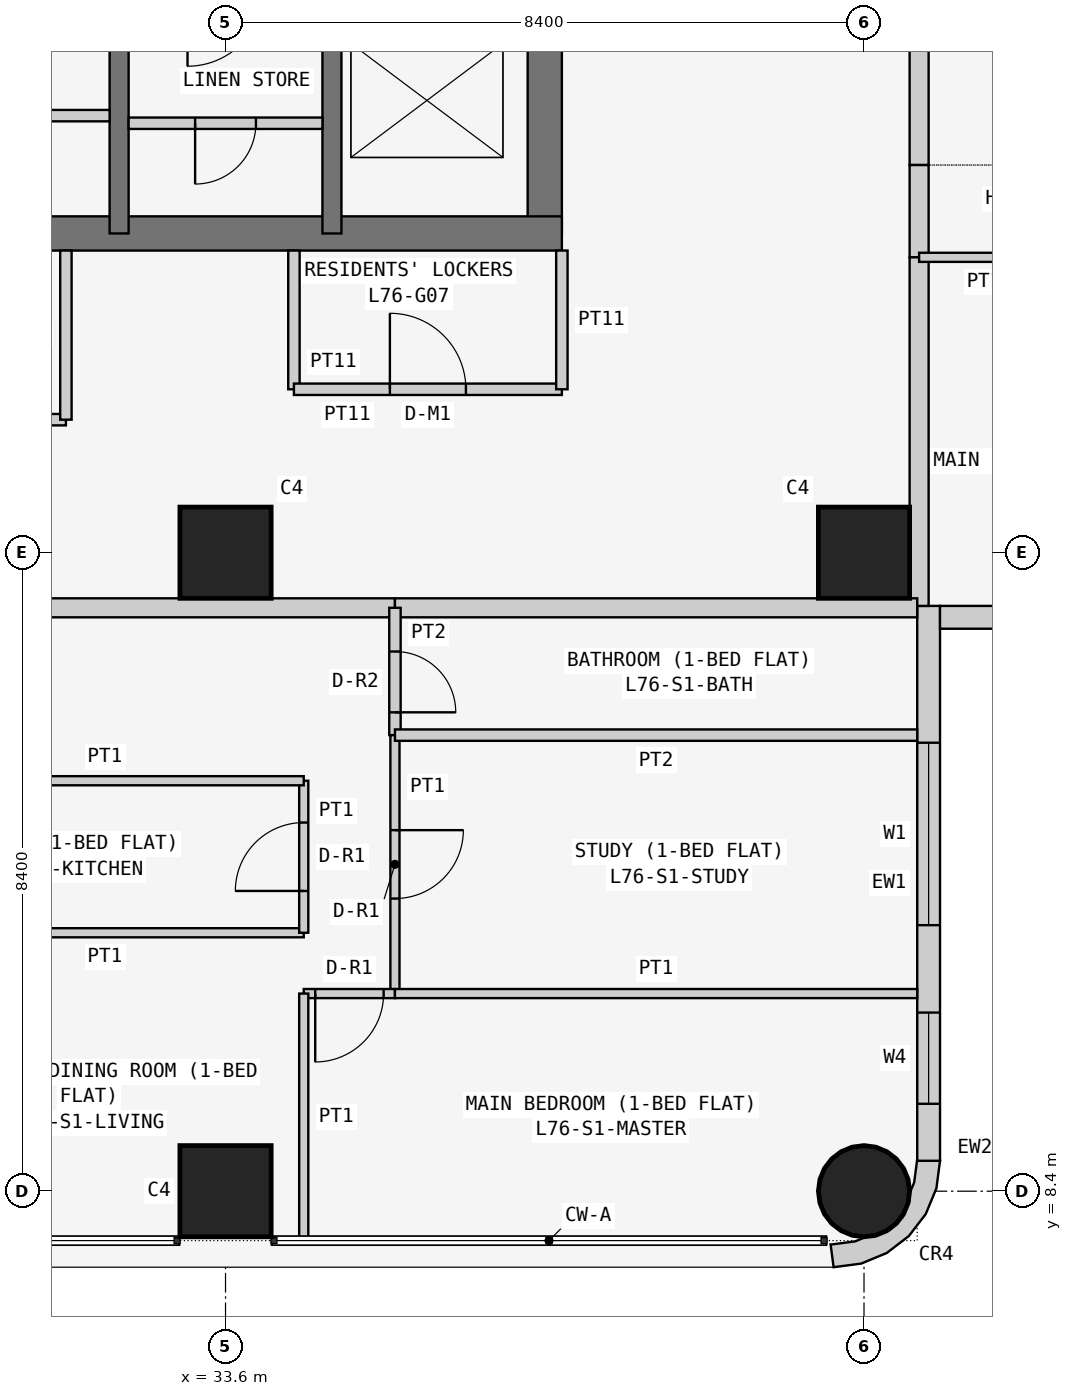
"""IFC4 building model, lengths in metres.
Left out: names, types, materials, properties, quantities, classifications, styles, units other than length and angle.
Written with IfcOpenShell. Run it as: python <this file> out.ifc"""

import sys

from ifc_helpers import new_model, si_unit, direction, frame, frame_2d, origin, origin_2d, place, context, subcontext, project, spatial, polyline, rectangle, circle, outline, extrude, element, fill, save


model = new_model("IFC4")
c1 = context("Model", 3, precision=1e-05, world=origin(), true_north=direction((0.0, 1.0)))
c2 = subcontext(c1, "Body", "Model", "MODEL_VIEW")
j1 = project(units=[si_unit("LENGTHUNIT", "METRE"), si_unit("PLANEANGLEUNIT", "RADIAN")], contexts=[c1])
p1 = place(None, origin())
s1 = spatial("IfcSite", under=j1, at=p1, CompositionType="ELEMENT")
p2 = place(p1, origin())
s2 = spatial("IfcBuilding", under=s1, at=p2, CompositionType="ELEMENT")
p3 = place(p2, frame((0.0, 0.0, 290.1)))
s3 = spatial("IfcBuildingStorey", under=s2, at=p3, CompositionType="ELEMENT", Elevation=290.1)
for number, where, z_axis, x_axis in (
    (1, (33.6, 8.4, 0.0), (0.0, 0.0, 1.0), (1.0, 0.0, 0.0)),
    (2, (33.6, 16.8, 0.0), (0.0, 0.0, 1.0), (1.0, 0.0, 0.0)),
):
    element("IfcColumn", number, at=place(p3, frame(where, z_axis=z_axis, x_axis=x_axis)), inside=s3, PredefinedType="COLUMN", context=c2, shape_type="SweptSolid", body=[
        extrude(rectangle(XDim=1.2, YDim=1.2, at=origin_2d()), origin(), (0.0, 0.0, 1.0), 3.6),
    ])
p4 = place(p3, frame((42.0, 8.4, 0.0), z_axis=(0.0, 0.0, 1.0), x_axis=(1.0, 0.0, 0.0)))
e3 = element("IfcColumn", 3, at=p4, inside=s3, PredefinedType="COLUMN", context=c2, shape_type="SweptSolid", body=[
    extrude(circle(Radius=0.6, at=origin_2d()), origin(), (0.0, 0.0, 1.0), 3.6),
])
p5 = place(p3, frame((42.0, 16.8, 0.0), z_axis=(0.0, 0.0, 1.0), x_axis=(1.0, 0.0, 0.0)))
e4 = element("IfcColumn", 4, at=p5, inside=s3, PredefinedType="COLUMN", context=c2, shape_type="SweptSolid", body=[
    extrude(rectangle(XDim=1.2, YDim=1.2, at=origin_2d()), origin(), (0.0, 0.0, 1.0), 3.6),
])
p6 = place(p3, frame((21.0, 21.0, 0.0), z_axis=(0.0, 0.0, 1.0), x_axis=(1.0, 0.0, 0.0)))
e5 = element("IfcWall", 5, at=p6, inside=s3, PredefinedType="SHEAR", context=c2, shape_type="SweptSolid", body=[
    extrude(rectangle(XDim=17.025, YDim=0.45, at=frame_2d((8.512, 0.0))), origin(), (0.0, 0.0, 1.0), 3.6),
])
p7 = place(p3, frame((37.8, 21.0, 0.0), z_axis=(0.0, 0.0, 1.0), x_axis=(0.0, 1.0, 0.0)))
e6 = element("IfcWall", 6, at=p7, inside=s3, PredefinedType="SHEAR", context=c2, shape_type="SweptSolid", body=[
    extrude(rectangle(XDim=17.025, YDim=0.45, at=frame_2d((8.512, 0.0))), origin(), (0.0, 0.0, 1.0), 3.6),
])
p8 = place(p7, frame((5.2, 0.0, 0.0)))
e7 = element("IfcOpeningElement", 7, at=p8, cuts=e6, PredefinedType="OPENING", context=c2, shape_type="SweptSolid", body=[
    extrude(rectangle(XDim=1.2, YDim=2.1, at=frame_2d((0.6, 1.05))), frame((0.0, 0.235, 0.0), z_axis=(0.0, -1.0, 0.0), x_axis=(1.0, 0.0, 0.0)), (0.0, 0.0, 1.0), 0.47),
])
for number, where, z_axis, x_axis in (
    (8, (32.2, 21.0, 0.0), (0.0, 0.0, 1.0), (0.0, 1.0, 0.0)),
    (9, (35.0, 21.0, 0.0), (0.0, 0.0, 1.0), (0.0, 1.0, 0.0)),
):
    element("IfcWall", number, at=place(p3, frame(where, z_axis=z_axis, x_axis=x_axis)), inside=s3, PredefinedType="SHEAR", context=c2, shape_type="SweptSolid", body=[
        extrude(rectangle(XDim=3.2, YDim=0.25, at=frame_2d((1.6, 0.0))), origin(), (0.0, 0.0, 1.0), 3.6),
    ])
p9 = place(p3, frame((42.85, 8.8, 0.0), z_axis=(0.0, 0.0, 1.0), x_axis=(0.0, 1.0, 0.0)))
e10 = element("IfcWall", 10, at=p9, inside=s3, PredefinedType="SOLIDWALL", context=c2, shape_type="SweptSolid", body=[
    extrude(rectangle(XDim=7.3, YDim=0.3, at=frame_2d((3.65, 0.0))), origin(), (0.0, 0.0, 1.0), 3.45),
])
p10 = place(p9, frame((3.1, 0.0, 0.9)))
e11 = element("IfcOpeningElement", 11, at=p10, cuts=e10, PredefinedType="OPENING", context=c2, shape_type="SweptSolid", body=[
    extrude(rectangle(XDim=2.4, YDim=1.5, at=frame_2d((1.2, 0.75))), frame((0.0, 0.16, 0.0), z_axis=(0.0, -1.0, 0.0), x_axis=(1.0, 0.0, 0.0)), (0.0, 0.0, 1.0), 0.32),
])
p11 = place(p9, frame((0.75, 0.0, 0.9)))
e12 = element("IfcOpeningElement", 12, at=p11, cuts=e10, PredefinedType="OPENING", context=c2, shape_type="SweptSolid", body=[
    extrude(rectangle(XDim=1.2, YDim=1.5, at=frame_2d((0.6, 0.75))), frame((0.0, 0.16, 0.0), z_axis=(0.0, -1.0, 0.0), x_axis=(1.0, 0.0, 0.0)), (0.0, 0.0, 1.0), 0.32),
])
p12 = place(p3, frame((43.0, 15.95, 0.0), z_axis=(0.0, 0.0, 1.0), x_axis=(1.0, 0.0, 0.0)))
e13 = element("IfcWall", 13, at=p12, inside=s3, PredefinedType="SOLIDWALL", context=c2, shape_type="SweptSolid", body=[
    extrude(rectangle(XDim=7.0, YDim=0.3, at=frame_2d((3.5, 0.0))), origin(), (0.0, 0.0, 1.0), 3.45),
])
p13 = place(p12, frame((1.5, 0.0, 0.9)))
e14 = element("IfcOpeningElement", 14, at=p13, cuts=e13, PredefinedType="OPENING", context=c2, shape_type="SweptSolid", body=[
    extrude(rectangle(XDim=2.4, YDim=1.5, at=frame_2d((1.2, 0.75))), frame((0.0, 0.16, 0.0), z_axis=(0.0, -1.0, 0.0), x_axis=(1.0, 0.0, 0.0)), (0.0, 0.0, 1.0), 0.32),
])
p14 = place(p12, frame((5.05, 0.0, 0.9)))
e15 = element("IfcOpeningElement", 15, at=p14, cuts=e13, PredefinedType="OPENING", context=c2, shape_type="SweptSolid", body=[
    extrude(rectangle(XDim=1.2, YDim=1.5, at=frame_2d((0.6, 0.75))), frame((0.0, 0.16, 0.0), z_axis=(0.0, -1.0, 0.0), x_axis=(1.0, 0.0, 0.0)), (0.0, 0.0, 1.0), 0.32),
])
p15 = place(p3, frame((41.638, 7.824, 0.0), z_axis=(0.0, 0.0, 1.0), x_axis=(0.707106781187, -0.707106781187, 0.0)))
e16 = element("IfcWall", 16, at=p15, inside=s3, PredefinedType="SOLIDWALL", context=c2, shape_type="SweptSolid", body=[
    extrude(outline(polyline([(0.033, 1.469), (0.047, 1.455), (0.233, 1.212), (0.292, 1.069), (0.358, 1.003), (0.449, 0.782), (0.449, 0.543), (0.358, 0.322), (0.292, 0.257), (0.233, 0.114), (0.047, -0.129), (0.033, -0.143), (0.273, -0.327), (0.495, -0.037), (0.635, 0.301), (0.683, 0.663), (0.635, 1.025), (0.495, 1.363), (0.273, 1.653), (0.033, 1.469)])), origin(), (0.0, 0.0, 1.0), 3.45),
])
p16 = place(p3, frame((27.3, 18.55, 0.0), z_axis=(0.0, 0.0, 1.0), x_axis=(1.0, 0.0, 0.0)))
e17 = element("IfcWall", 17, at=p16, inside=s3, PredefinedType="PARTITIONING", context=c2, shape_type="SweptSolid", body=[
    extrude(rectangle(XDim=4.2, YDim=0.15, at=frame_2d((2.1, 0.0))), origin(), (0.0, 0.0, 1.0), 3.45),
])
p17 = place(p16, frame((1.6, 0.0, 0.0)))
e18 = element("IfcOpeningElement", 18, at=p17, cuts=e17, PredefinedType="OPENING", context=c2, shape_type="SweptSolid", body=[
    extrude(rectangle(XDim=1.0, YDim=2.1, at=frame_2d((0.5, 1.05))), frame((0.0, 0.085, 0.0), z_axis=(0.0, -1.0, 0.0), x_axis=(1.0, 0.0, 0.0)), (0.0, 0.0, 1.0), 0.17),
])
p18 = place(p3, frame((31.5, 18.55, 0.0), z_axis=(0.0, 0.0, 1.0), x_axis=(0.0, 1.0, 0.0)))
e19 = element("IfcWall", 19, at=p18, inside=s3, PredefinedType="PARTITIONING", context=c2, shape_type="SweptSolid", body=[
    extrude(rectangle(XDim=2.225, YDim=0.15, at=frame_2d((1.112, 0.0))), origin(), (0.0, 0.0, 1.0), 3.45),
])
p19 = place(p3, frame((34.5, 20.775, 0.0), z_axis=(0.0, 0.0, 1.0), x_axis=(0.0, -1.0, 0.0)))
e20 = element("IfcWall", 20, at=p19, inside=s3, PredefinedType="PARTITIONING", context=c2, shape_type="SweptSolid", body=[
    extrude(rectangle(XDim=1.825, YDim=0.15, at=frame_2d((0.913, 0.0))), origin(), (0.0, 0.0, 1.0), 3.45),
])
p20 = place(p3, frame((34.5, 18.95, 0.0), z_axis=(0.0, 0.0, 1.0), x_axis=(1.0, 0.0, 0.0)))
e21 = element("IfcWall", 21, at=p20, inside=s3, PredefinedType="PARTITIONING", context=c2, shape_type="SweptSolid", body=[
    extrude(rectangle(XDim=3.525, YDim=0.15, at=frame_2d((1.762, 0.0))), origin(), (0.0, 0.0, 1.0), 3.45),
])
p21 = place(p20, frame((1.262, 0.0, 0.0)))
e22 = element("IfcOpeningElement", 22, at=p21, cuts=e21, PredefinedType="OPENING", context=c2, shape_type="SweptSolid", body=[
    extrude(rectangle(XDim=1.0, YDim=2.1, at=frame_2d((0.5, 1.05))), frame((0.0, 0.085, 0.0), z_axis=(0.0, -1.0, 0.0), x_axis=(1.0, 0.0, 0.0)), (0.0, 0.0, 1.0), 0.17),
])
p22 = place(p3, frame((38.025, 18.95, 0.0), z_axis=(0.0, 0.0, 1.0), x_axis=(0.0, 1.0, 0.0)))
e23 = element("IfcWall", 23, at=p22, inside=s3, PredefinedType="PARTITIONING", context=c2, shape_type="SweptSolid", body=[
    extrude(rectangle(XDim=1.825, YDim=0.15, at=frame_2d((0.913, 0.0))), origin(), (0.0, 0.0, 1.0), 3.45),
])
p23 = place(p3, frame((42.725, 29.4, 0.0), z_axis=(0.0, 0.0, 1.0), x_axis=(0.0, -1.0, 0.0)))
e24 = element("IfcWall", 24, at=p23, inside=s3, PredefinedType="PARTITIONING", context=c2, shape_type="SweptSolid", body=[
    extrude(rectangle(XDim=7.5, YDim=0.25, at=frame_2d((3.75, 0.0))), origin(), (0.0, 0.0, 1.0), 3.45),
])
p24 = place(p23, frame((0.8, 0.0, 0.0)))
e25 = element("IfcOpeningElement", 25, at=p24, cuts=e24, PredefinedType="OPENING", context=c2, shape_type="SweptSolid", body=[
    extrude(rectangle(XDim=1.0, YDim=2.1, at=frame_2d((0.5, 1.05))), frame((0.0, 0.135, 0.0), z_axis=(0.0, -1.0, 0.0), x_axis=(1.0, 0.0, 0.0)), (0.0, 0.0, 1.0), 0.27),
])
p25 = place(p3, frame((42.725, 21.9, 0.0), z_axis=(0.0, 0.0, 1.0), x_axis=(0.0, -1.0, 0.0)))
e26 = element("IfcWall", 26, at=p25, inside=s3, PredefinedType="PARTITIONING", context=c2, shape_type="SweptSolid", body=[
    extrude(rectangle(XDim=1.214, YDim=0.25, at=frame_2d((0.607, 0.0))), origin(), (0.0, 0.0, 1.0), 3.45),
])
p26 = place(p3, frame((42.725, 20.686, 0.0), z_axis=(0.0, 0.0, 1.0), x_axis=(0.0, -1.0, 0.0)))
e27 = element("IfcWall", 27, at=p26, inside=s3, PredefinedType="PARTITIONING", context=c2, shape_type="SweptSolid", body=[
    extrude(rectangle(XDim=4.586, YDim=0.25, at=frame_2d((2.293, 0.0))), origin(), (0.0, 0.0, 1.0), 3.45),
])
p27 = place(p3, frame((35.829, 16.075, 0.0), z_axis=(0.0, 0.0, 1.0), x_axis=(-1.0, 0.0, 0.0)))
e28 = element("IfcWall", 28, at=p27, inside=s3, PredefinedType="PARTITIONING", context=c2, shape_type="SweptSolid", body=[
    extrude(rectangle(XDim=6.429, YDim=0.25, at=frame_2d((3.215, 0.0))), origin(), (0.0, 0.0, 1.0), 3.45),
])
p28 = place(p27, frame((4.929, 0.0, 0.0)))
e29 = element("IfcOpeningElement", 29, at=p28, cuts=e28, PredefinedType="OPENING", context=c2, shape_type="SweptSolid", body=[
    extrude(rectangle(XDim=1.0, YDim=2.1, at=frame_2d((0.5, 1.05))), frame((0.0, 0.135, 0.0), z_axis=(0.0, -1.0, 0.0), x_axis=(1.0, 0.0, 0.0)), (0.0, 0.0, 1.0), 0.27),
])
p29 = place(p3, frame((42.7, 16.075, 0.0), z_axis=(0.0, 0.0, 1.0), x_axis=(-1.0, 0.0, 0.0)))
e30 = element("IfcWall", 30, at=p29, inside=s3, PredefinedType="PARTITIONING", context=c2, shape_type="SweptSolid", body=[
    extrude(rectangle(XDim=6.871, YDim=0.25, at=frame_2d((3.436, 0.0))), origin(), (0.0, 0.0, 1.0), 3.45),
])
p30 = place(p3, frame((47.0, 20.686, 0.0), z_axis=(0.0, 0.0, 1.0), x_axis=(-1.0, 0.0, 0.0)))
e31 = element("IfcWall", 31, at=p30, inside=s3, PredefinedType="PARTITIONING", context=c2, shape_type="SweptSolid", body=[
    extrude(rectangle(XDim=4.275, YDim=0.12, at=frame_2d((2.137, 0.0))), origin(), (0.0, 0.0, 1.0), 3.45),
])
p31 = place(p30, frame((1.05, 0.0, 0.0)))
e32 = element("IfcOpeningElement", 32, at=p31, cuts=e31, PredefinedType="OPENING", context=c2, shape_type="SweptSolid", body=[
    extrude(rectangle(XDim=0.9, YDim=2.1, at=frame_2d((0.45, 1.05))), frame((0.0, 0.07, 0.0), z_axis=(0.0, -1.0, 0.0), x_axis=(1.0, 0.0, 0.0)), (0.0, 0.0, 1.0), 0.14),
])
p32 = place(p3, frame((29.4, 11.8, 0.0), z_axis=(0.0, 0.0, 1.0), x_axis=(1.0, 0.0, 0.0)))
e33 = element("IfcWall", 33, at=p32, inside=s3, PredefinedType="PARTITIONING", context=c2, shape_type="SweptSolid", body=[
    extrude(rectangle(XDim=5.229, YDim=0.12, at=frame_2d((2.615, 0.0))), origin(), (0.0, 0.0, 1.0), 3.45),
])
p33 = place(p3, frame((34.629, 11.8, 0.0), z_axis=(0.0, 0.0, 1.0), x_axis=(0.0, 1.0, 0.0)))
e34 = element("IfcWall", 34, at=p33, inside=s3, PredefinedType="PARTITIONING", context=c2, shape_type="SweptSolid", body=[
    extrude(rectangle(XDim=2.0, YDim=0.12, at=frame_2d((1.0, 0.0))), origin(), (0.0, 0.0, 1.0), 3.45),
])
p34 = place(p33, frame((0.55, 0.0, 0.0)))
e35 = element("IfcOpeningElement", 35, at=p34, cuts=e34, PredefinedType="OPENING", context=c2, shape_type="SweptSolid", body=[
    extrude(rectangle(XDim=0.9, YDim=2.1, at=frame_2d((0.45, 1.05))), frame((0.0, 0.07, 0.0), z_axis=(0.0, -1.0, 0.0), x_axis=(1.0, 0.0, 0.0)), (0.0, 0.0, 1.0), 0.14),
])
p35 = place(p3, frame((34.629, 13.8, 0.0), z_axis=(0.0, 0.0, 1.0), x_axis=(-1.0, 0.0, 0.0)))
e36 = element("IfcWall", 36, at=p35, inside=s3, PredefinedType="PARTITIONING", context=c2, shape_type="SweptSolid", body=[
    extrude(rectangle(XDim=5.229, YDim=0.12, at=frame_2d((2.615, 0.0))), origin(), (0.0, 0.0, 1.0), 3.45),
])
p36 = place(p3, frame((35.829, 16.075, 0.0), z_axis=(0.0, 0.0, 1.0), x_axis=(0.0, -1.0, 0.0)))
e37 = element("IfcWall", 37, at=p36, inside=s3, PredefinedType="PARTITIONING", context=c2, shape_type="SweptSolid", body=[
    extrude(rectangle(XDim=1.675, YDim=0.15, at=frame_2d((0.837, 0.0))), origin(), (0.0, 0.0, 1.0), 3.45),
])
p37 = place(p36, frame((0.575, 0.0, 0.0)))
e38 = element("IfcOpeningElement", 38, at=p37, cuts=e37, PredefinedType="OPENING", context=c2, shape_type="SweptSolid", body=[
    extrude(rectangle(XDim=0.8, YDim=2.1, at=frame_2d((0.4, 1.05))), frame((0.0, 0.085, 0.0), z_axis=(0.0, -1.0, 0.0), x_axis=(1.0, 0.0, 0.0)), (0.0, 0.0, 1.0), 0.17),
])
p38 = place(p3, frame((35.829, 14.4, 0.0), z_axis=(0.0, 0.0, 1.0), x_axis=(0.0, -1.0, 0.0)))
e39 = element("IfcWall", 39, at=p38, inside=s3, PredefinedType="PARTITIONING", context=c2, shape_type="SweptSolid", body=[
    extrude(rectangle(XDim=3.4, YDim=0.12, at=frame_2d((1.7, 0.0))), origin(), (0.0, 0.0, 1.0), 3.45),
])
p39 = place(p38, frame((1.25, 0.0, 0.0)))
e40 = element("IfcOpeningElement", 40, at=p39, cuts=e39, PredefinedType="OPENING", context=c2, shape_type="SweptSolid", body=[
    extrude(rectangle(XDim=0.9, YDim=2.1, at=frame_2d((0.45, 1.05))), frame((0.0, 0.07, 0.0), z_axis=(0.0, -1.0, 0.0), x_axis=(1.0, 0.0, 0.0)), (0.0, 0.0, 1.0), 0.14),
])
p40 = place(p3, frame((35.829, 11.0, 0.0), z_axis=(0.0, 0.0, 1.0), x_axis=(-1.0, 0.0, 0.0)))
e41 = element("IfcWall", 41, at=p40, inside=s3, PredefinedType="PARTITIONING", context=c2, shape_type="SweptSolid", body=[
    extrude(rectangle(XDim=1.2, YDim=0.12, at=frame_2d((0.6, 0.0))), origin(), (0.0, 0.0, 1.0), 3.45),
])
p41 = place(p40, frame((0.149, 0.0, 0.0)))
e42 = element("IfcOpeningElement", 42, at=p41, cuts=e41, PredefinedType="OPENING", context=c2, shape_type="SweptSolid", body=[
    extrude(rectangle(XDim=0.9, YDim=2.1, at=frame_2d((0.45, 1.05))), frame((0.0, 0.07, 0.0), z_axis=(0.0, -1.0, 0.0), x_axis=(1.0, 0.0, 0.0)), (0.0, 0.0, 1.0), 0.14),
])
p42 = place(p3, frame((34.629, 11.0, 0.0), z_axis=(0.0, 0.0, 1.0), x_axis=(0.0, -1.0, 0.0)))
e43 = element("IfcWall", 43, at=p42, inside=s3, PredefinedType="PARTITIONING", context=c2, shape_type="SweptSolid", body=[
    extrude(rectangle(XDim=3.25, YDim=0.12, at=frame_2d((1.625, 0.0))), origin(), (0.0, 0.0, 1.0), 3.45),
])
p43 = place(p3, frame((35.829, 14.4, 0.0), z_axis=(0.0, 0.0, 1.0), x_axis=(1.0, 0.0, 0.0)))
e44 = element("IfcWall", 44, at=p43, inside=s3, PredefinedType="PARTITIONING", context=c2, shape_type="SweptSolid", body=[
    extrude(rectangle(XDim=6.871, YDim=0.15, at=frame_2d((3.436, 0.0))), origin(), (0.0, 0.0, 1.0), 3.45),
])
p44 = place(p3, frame((35.829, 11.0, 0.0), z_axis=(0.0, 0.0, 1.0), x_axis=(1.0, 0.0, 0.0)))
e45 = element("IfcWall", 45, at=p44, inside=s3, PredefinedType="PARTITIONING", context=c2, shape_type="SweptSolid", body=[
    extrude(rectangle(XDim=6.871, YDim=0.12, at=frame_2d((3.436, 0.0))), origin(), (0.0, 0.0, 1.0), 3.45),
])
p45 = place(p3, frame((29.525, 22.55, 0.0), z_axis=(0.0, 0.0, 1.0), x_axis=(1.0, 0.0, 0.0)))
e46 = element("IfcWall", 46, at=p45, inside=s3, PredefinedType="PARTITIONING", context=c2, shape_type="SweptSolid", body=[
    extrude(rectangle(XDim=2.55, YDim=0.15, at=frame_2d((1.275, 0.0))), origin(), (0.0, 0.0, 1.0), 3.45),
])
p46 = place(p45, frame((0.875, 0.0, 0.0)))
e47 = element("IfcOpeningElement", 47, at=p46, cuts=e46, PredefinedType="OPENING", context=c2, shape_type="SweptSolid", body=[
    extrude(rectangle(XDim=0.8, YDim=2.1, at=frame_2d((0.4, 1.05))), frame((0.0, 0.085, 0.0), z_axis=(0.0, -1.0, 0.0), x_axis=(1.0, 0.0, 0.0)), (0.0, 0.0, 1.0), 0.17),
])
p47 = place(p3, frame((32.325, 22.45, 0.0), z_axis=(0.0, 0.0, 1.0), x_axis=(1.0, 0.0, 0.0)))
e48 = element("IfcWall", 48, at=p47, inside=s3, PredefinedType="PARTITIONING", context=c2, shape_type="SweptSolid", body=[
    extrude(rectangle(XDim=2.55, YDim=0.15, at=frame_2d((1.275, 0.0))), origin(), (0.0, 0.0, 1.0), 3.45),
])
p48 = place(p47, frame((0.875, 0.0, 0.0)))
e49 = element("IfcOpeningElement", 49, at=p48, cuts=e48, PredefinedType="OPENING", context=c2, shape_type="SweptSolid", body=[
    extrude(rectangle(XDim=0.8, YDim=2.1, at=frame_2d((0.4, 1.05))), frame((0.0, 0.085, 0.0), z_axis=(0.0, -1.0, 0.0), x_axis=(1.0, 0.0, 0.0)), (0.0, 0.0, 1.0), 0.17),
])
p49 = place(p10, origin())
e50 = element("IfcWindow", 50, at=p49, inside=s3, PartitioningType="SINGLE_PANEL", PredefinedType="WINDOW", context=c2, shape_type="SweptSolid", body=[
    extrude(rectangle(XDim=2.4, YDim=1.5, at=frame_2d((1.2, 0.75))), frame((0.0, 0.03, 0.0), z_axis=(0.0, -1.0, 0.0), x_axis=(1.0, 0.0, 0.0)), (0.0, 0.0, 1.0), 0.06),
])
fill(e11, e50)
p50 = place(p11, origin())
e51 = element("IfcWindow", 51, at=p50, inside=s3, PartitioningType="SINGLE_PANEL", PredefinedType="WINDOW", context=c2, shape_type="SweptSolid", body=[
    extrude(rectangle(XDim=1.2, YDim=1.5, at=frame_2d((0.6, 0.75))), frame((0.0, 0.03, 0.0), z_axis=(0.0, -1.0, 0.0), x_axis=(1.0, 0.0, 0.0)), (0.0, 0.0, 1.0), 0.06),
])
fill(e12, e51)
p51 = place(p21, origin())
e52 = element("IfcDoor", 52, at=p51, inside=s3, OperationType="SINGLE_SWING_LEFT", PredefinedType="DOOR", context=c2, shape_type="SweptSolid", body=[
    extrude(rectangle(XDim=1.0, YDim=2.1, at=frame_2d((0.5, 1.05))), frame((0.0, 0.025, 0.0), z_axis=(0.0, -1.0, 0.0), x_axis=(1.0, 0.0, 0.0)), (0.0, 0.0, 1.0), 0.05),
])
fill(e22, e52)
p52 = place(p34, origin())
e53 = element("IfcDoor", 53, at=p52, inside=s3, OperationType="SINGLE_SWING_LEFT", PredefinedType="DOOR", context=c2, shape_type="SweptSolid", body=[
    extrude(rectangle(XDim=0.9, YDim=2.1, at=frame_2d((0.45, 1.05))), frame((0.0, 0.025, 0.0), z_axis=(0.0, -1.0, 0.0), x_axis=(1.0, 0.0, 0.0)), (0.0, 0.0, 1.0), 0.05),
])
fill(e35, e53)
p53 = place(p37, origin())
e54 = element("IfcDoor", 54, at=p53, inside=s3, OperationType="SINGLE_SWING_RIGHT", PredefinedType="DOOR", context=c2, shape_type="SweptSolid", body=[
    extrude(rectangle(XDim=0.8, YDim=2.1, at=frame_2d((0.4, 1.05))), frame((0.0, 0.025, 0.0), z_axis=(0.0, -1.0, 0.0), x_axis=(1.0, 0.0, 0.0)), (0.0, 0.0, 1.0), 0.05),
])
fill(e38, e54)
p54 = place(p39, origin())
e55 = element("IfcDoor", 55, at=p54, inside=s3, OperationType="SINGLE_SWING_LEFT", PredefinedType="DOOR", context=c2, shape_type="SweptSolid", body=[
    extrude(rectangle(XDim=0.9, YDim=2.1, at=frame_2d((0.45, 1.05))), frame((0.0, 0.025, 0.0), z_axis=(0.0, -1.0, 0.0), x_axis=(1.0, 0.0, 0.0)), (0.0, 0.0, 1.0), 0.05),
])
fill(e40, e55)
p55 = place(p41, origin())
e56 = element("IfcDoor", 56, at=p55, inside=s3, OperationType="SINGLE_SWING_RIGHT", PredefinedType="DOOR", context=c2, shape_type="SweptSolid", body=[
    extrude(rectangle(XDim=0.9, YDim=2.1, at=frame_2d((0.45, 1.05))), frame((0.0, 0.025, 0.0), z_axis=(0.0, -1.0, 0.0), x_axis=(1.0, 0.0, 0.0)), (0.0, 0.0, 1.0), 0.05),
])
fill(e42, e56)
p56 = place(p48, frame((0.8, 0.0, 0.0), z_axis=(0.0, 0.0, 1.0), x_axis=(-1.0, 0.0, 0.0)))
e57 = element("IfcDoor", 57, at=p56, inside=s3, OperationType="SINGLE_SWING_RIGHT", PredefinedType="DOOR", context=c2, shape_type="SweptSolid", body=[
    extrude(rectangle(XDim=0.8, YDim=2.1, at=frame_2d((0.4, 1.05))), frame((0.0, 0.025, 0.0), z_axis=(0.0, -1.0, 0.0), x_axis=(1.0, 0.0, 0.0)), (0.0, 0.0, 1.0), 0.05),
])
fill(e49, e57)
save(model, sys.argv[1])
